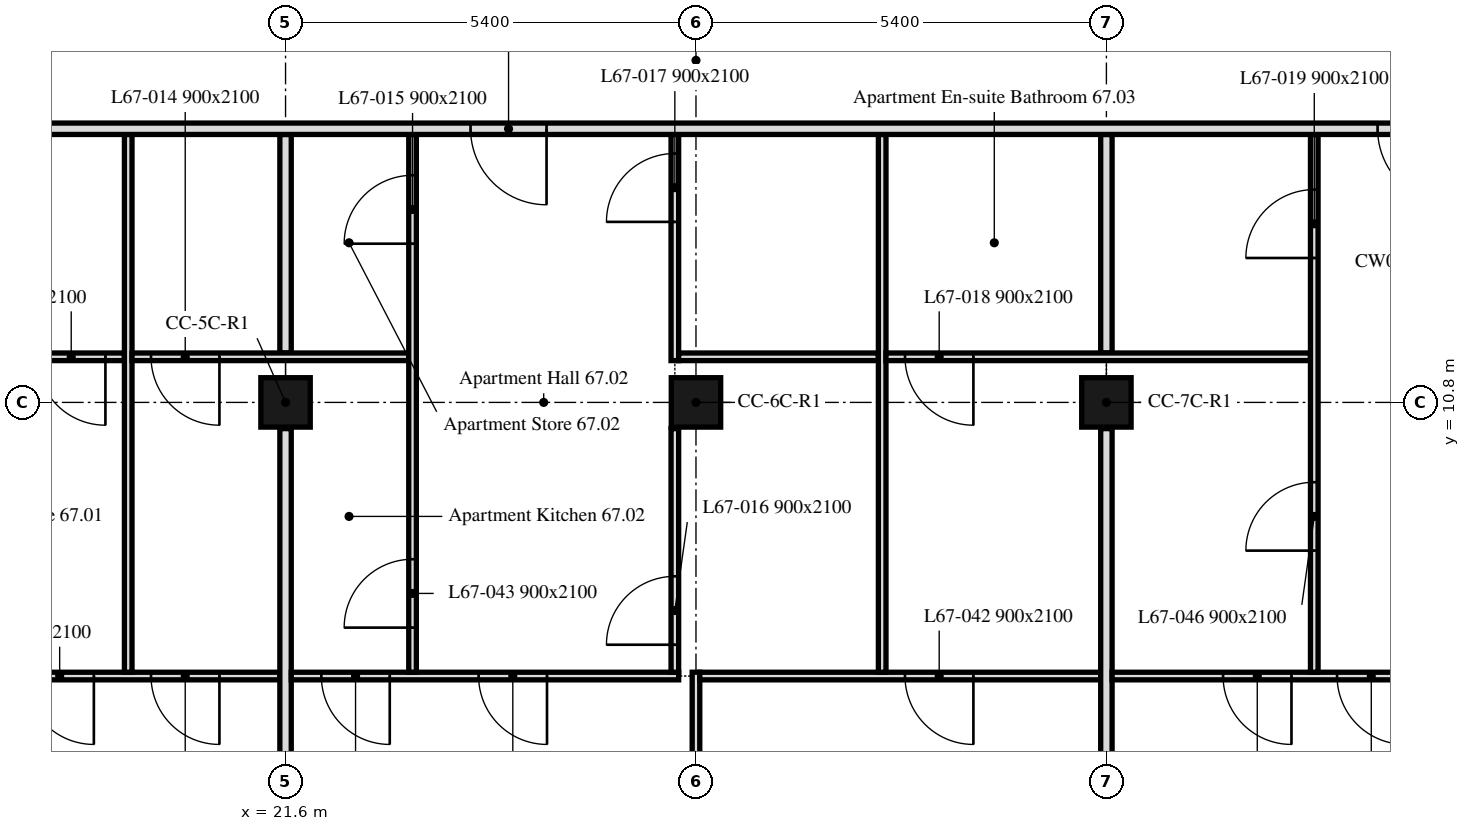
"""IFC4 building model, lengths in metres.
Left out: names, types, materials, properties, quantities, classifications, styles, units other than length and angle.
Written with IfcOpenShell. Run it as: python <this file> out.ifc"""

import sys

from ifc_helpers import new_model, si_unit, direction, frame, frame_2d, origin, origin_2d, place, context, subcontext, project, spatial, rectangle, extrude, element, fill, save


model = new_model("IFC4")
c1 = context("Model", 3, precision=1e-05, world=origin(), true_north=direction((0.0, 1.0)))
c2 = subcontext(c1, "Body", "Model", "MODEL_VIEW")
j1 = project(units=[si_unit("LENGTHUNIT", "METRE"), si_unit("PLANEANGLEUNIT", "RADIAN")], contexts=[c1])
p1 = place(None, origin())
s1 = spatial("IfcSite", under=j1, at=p1, CompositionType="ELEMENT")
p2 = place(p1, origin())
s2 = spatial("IfcBuilding", under=s1, at=p2, CompositionType="ELEMENT")
p3 = place(p2, frame((0.0, 0.0, 275.2)))
s3 = spatial("IfcBuildingStorey", under=s2, at=p3, CompositionType="ELEMENT", Elevation=275.2)
for number, where, z_axis, x_axis in (
    (1, (21.6, 10.8, 0.0), (0.0, 0.0, 1.0), (1.0, 0.0, 0.0)),
    (2, (27.0, 10.8, 0.0), (0.0, 0.0, 1.0), (1.0, 0.0, 0.0)),
    (3, (32.4, 10.8, 0.0), (0.0, 0.0, 1.0), (1.0, 0.0, 0.0)),
):
    element("IfcColumn", number, at=place(p3, frame(where, z_axis=z_axis, x_axis=x_axis)), inside=s3, PredefinedType="COLUMN", context=c2, shape_type="SweptSolid", body=[
        extrude(rectangle(XDim=0.65, YDim=0.65, at=origin_2d()), origin(), (0.0, 0.0, 1.0), 3.0),
    ])
p4 = place(p3, frame((21.525, 7.2, 0.0), z_axis=(0.0, 0.0, 1.0), x_axis=(-1.0, 0.0, 0.0)))
e4 = element("IfcWall", 4, at=p4, inside=s3, PredefinedType="PARTITIONING", context=c2, shape_type="SweptSolid", body=[
    extrude(rectangle(XDim=5.275, YDim=0.1, at=frame_2d((2.637, 0.0))), origin(), (0.0, 0.0, 1.0), 3.0),
])
p5 = place(p4, frame((2.447, 0.0, 0.0)))
e5 = element("IfcOpeningElement", 5, at=p5, cuts=e4, PredefinedType="OPENING", context=c2, shape_type="SweptSolid", body=[
    extrude(rectangle(XDim=0.9, YDim=2.1, at=frame_2d((0.45, 1.05))), frame((0.0, 0.05, 0.0), z_axis=(0.0, -1.0, 0.0), x_axis=(1.0, 0.0, 0.0)), (0.0, 0.0, 1.0), 0.1),
])
p6 = place(p4, frame((0.795, 0.0, 0.0)))
e6 = element("IfcOpeningElement", 6, at=p6, cuts=e4, PredefinedType="OPENING", context=c2, shape_type="SweptSolid", body=[
    extrude(rectangle(XDim=0.9, YDim=2.1, at=frame_2d((0.45, 1.05))), frame((0.0, 0.05, 0.0), z_axis=(0.0, -1.0, 0.0), x_axis=(1.0, 0.0, 0.0)), (0.0, 0.0, 1.0), 0.1),
])
p7 = place(p3, frame((19.48, 11.4, 0.0), z_axis=(0.0, 0.0, 1.0), x_axis=(-1.0, 0.0, 0.0)))
e7 = element("IfcWall", 7, at=p7, inside=s3, PredefinedType="PARTITIONING", context=c2, shape_type="SweptSolid", body=[
    extrude(rectangle(XDim=3.35, YDim=0.1, at=frame_2d((1.675, 0.0))), origin(), (0.0, 0.0, 1.0), 3.0),
])
p8 = place(p7, frame((0.25, 0.0, 0.0)))
e8 = element("IfcOpeningElement", 8, at=p8, cuts=e7, PredefinedType="OPENING", context=c2, shape_type="SweptSolid", body=[
    extrude(rectangle(XDim=0.9, YDim=2.1, at=frame_2d((0.45, 1.05))), frame((0.0, 0.05, 0.0), z_axis=(0.0, -1.0, 0.0), x_axis=(1.0, 0.0, 0.0)), (0.0, 0.0, 1.0), 0.1),
])
p9 = place(p3, frame((19.53, 7.25, 0.0), z_axis=(0.0, 0.0, 1.0), x_axis=(0.0, 1.0, 0.0)))
e9 = element("IfcWall", 9, at=p9, inside=s3, PredefinedType="PARTITIONING", context=c2, shape_type="SweptSolid", body=[
    extrude(rectangle(XDim=7.075, YDim=0.1, at=frame_2d((3.538, 0.0))), origin(), (0.0, 0.0, 1.0), 3.0),
])
p10 = place(p3, frame((21.6, 5.745, 0.0), z_axis=(0.0, 0.0, 1.0), x_axis=(0.0, 1.0, 0.0)))
e10 = element("IfcWall", 10, at=p10, inside=s3, PredefinedType="PARTITIONING", context=c2, shape_type="SweptSolid", body=[
    extrude(rectangle(XDim=4.71, YDim=0.15, at=frame_2d((2.355, 0.0))), origin(), (0.0, 0.0, 1.0), 2.4),
])
p11 = place(p3, frame((21.6, 11.45, 0.0), z_axis=(0.0, 0.0, 1.0), x_axis=(0.0, 1.0, 0.0)))
e11 = element("IfcWall", 11, at=p11, inside=s3, PredefinedType="PARTITIONING", context=c2, shape_type="SweptSolid", body=[
    extrude(rectangle(XDim=2.875, YDim=0.15, at=frame_2d((1.438, 0.0))), origin(), (0.0, 0.0, 1.0), 2.4),
])
p12 = place(p3, frame((27.0, 5.745, 0.0), z_axis=(0.0, 0.0, 1.0), x_axis=(0.0, 1.0, 0.0)))
e12 = element("IfcWall", 12, at=p12, inside=s3, PredefinedType="PARTITIONING", context=c2, shape_type="SweptSolid", body=[
    extrude(rectangle(XDim=1.505, YDim=0.1, at=frame_2d((0.752, 0.0))), origin(), (0.0, 0.0, 1.0), 2.4),
])
p13 = place(p3, frame((26.772, 7.2, 0.0), z_axis=(0.0, 0.0, 1.0), x_axis=(-1.0, 0.0, 0.0)))
e13 = element("IfcWall", 13, at=p13, inside=s3, PredefinedType="PARTITIONING", context=c2, shape_type="SweptSolid", body=[
    extrude(rectangle(XDim=5.097, YDim=0.1, at=frame_2d((2.548, 0.0))), origin(), (0.0, 0.0, 1.0), 3.0),
])
p14 = place(p13, frame((3.801, 0.0, 0.0)))
e14 = element("IfcOpeningElement", 14, at=p14, cuts=e13, PredefinedType="OPENING", context=c2, shape_type="SweptSolid", body=[
    extrude(rectangle(XDim=0.9, YDim=2.1, at=frame_2d((0.45, 1.05))), frame((0.0, 0.05, 0.0), z_axis=(0.0, -1.0, 0.0), x_axis=(1.0, 0.0, 0.0)), (0.0, 0.0, 1.0), 0.1),
])
p15 = place(p13, frame((1.732, 0.0, 0.0)))
e15 = element("IfcOpeningElement", 15, at=p15, cuts=e13, PredefinedType="OPENING", context=c2, shape_type="SweptSolid", body=[
    extrude(rectangle(XDim=0.9, YDim=2.1, at=frame_2d((0.45, 1.05))), frame((0.0, 0.05, 0.0), z_axis=(0.0, -1.0, 0.0), x_axis=(1.0, 0.0, 0.0)), (0.0, 0.0, 1.0), 0.1),
])
p16 = place(p3, frame((32.325, 7.2, 0.0), z_axis=(0.0, 0.0, 1.0), x_axis=(-1.0, 0.0, 0.0)))
e16 = element("IfcWall", 16, at=p16, inside=s3, PredefinedType="PARTITIONING", context=c2, shape_type="SweptSolid", body=[
    extrude(rectangle(XDim=5.275, YDim=0.1, at=frame_2d((2.637, 0.0))), origin(), (0.0, 0.0, 1.0), 3.0),
])
p17 = place(p16, frame((1.675, 0.0, 0.0)))
e17 = element("IfcOpeningElement", 17, at=p17, cuts=e16, PredefinedType="OPENING", context=c2, shape_type="SweptSolid", body=[
    extrude(rectangle(XDim=0.9, YDim=2.1, at=frame_2d((0.45, 1.05))), frame((0.0, 0.05, 0.0), z_axis=(0.0, -1.0, 0.0), x_axis=(1.0, 0.0, 0.0)), (0.0, 0.0, 1.0), 0.1),
])
p18 = place(p3, frame((23.221, 11.4, 0.0), z_axis=(0.0, 0.0, 1.0), x_axis=(-1.0, 0.0, 0.0)))
e18 = element("IfcWall", 18, at=p18, inside=s3, PredefinedType="PARTITIONING", context=c2, shape_type="SweptSolid", body=[
    extrude(rectangle(XDim=3.641, YDim=0.1, at=frame_2d((1.82, 0.0))), origin(), (0.0, 0.0, 1.0), 2.4),
])
p19 = place(p18, frame((2.491, 0.0, 0.0)))
e19 = element("IfcOpeningElement", 19, at=p19, cuts=e18, PredefinedType="OPENING", context=c2, shape_type="SweptSolid", body=[
    extrude(rectangle(XDim=0.9, YDim=2.1, at=frame_2d((0.45, 1.05))), frame((0.0, 0.05, 0.0), z_axis=(0.0, -1.0, 0.0), x_axis=(1.0, 0.0, 0.0)), (0.0, 0.0, 1.0), 0.1),
])
p20 = place(p3, frame((23.271, 7.25, 0.0), z_axis=(0.0, 0.0, 1.0), x_axis=(0.0, 1.0, 0.0)))
e20 = element("IfcWall", 20, at=p20, inside=s3, PredefinedType="PARTITIONING", context=c2, shape_type="SweptSolid", body=[
    extrude(rectangle(XDim=7.075, YDim=0.1, at=frame_2d((3.538, 0.0))), origin(), (0.0, 0.0, 1.0), 3.0),
])
p21 = place(p20, frame((5.638, 0.0, 0.0)))
e21 = element("IfcOpeningElement", 21, at=p21, cuts=e20, PredefinedType="OPENING", context=c2, shape_type="SweptSolid", body=[
    extrude(rectangle(XDim=0.9, YDim=2.1, at=frame_2d((0.45, 1.05))), frame((0.0, 0.05, 0.0), z_axis=(0.0, -1.0, 0.0), x_axis=(1.0, 0.0, 0.0)), (0.0, 0.0, 1.0), 0.1),
])
p22 = place(p20, frame((0.587, 0.0, 0.0)))
e22 = element("IfcOpeningElement", 22, at=p22, cuts=e20, PredefinedType="OPENING", context=c2, shape_type="SweptSolid", body=[
    extrude(rectangle(XDim=0.9, YDim=2.1, at=frame_2d((0.45, 1.05))), frame((0.0, 0.05, 0.0), z_axis=(0.0, -1.0, 0.0), x_axis=(1.0, 0.0, 0.0)), (0.0, 0.0, 1.0), 0.1),
])
p23 = place(p3, frame((26.722, 7.25, 0.0), z_axis=(0.0, 0.0, 1.0), x_axis=(0.0, 1.0, 0.0)))
e23 = element("IfcWall", 23, at=p23, inside=s3, PredefinedType="PARTITIONING", context=c2, shape_type="SweptSolid", body=[
    extrude(rectangle(XDim=3.205, YDim=0.1, at=frame_2d((1.603, 0.0))), origin(), (0.0, 0.0, 1.0), 3.0),
])
p24 = place(p23, frame((0.362, 0.0, 0.0)))
e24 = element("IfcOpeningElement", 24, at=p24, cuts=e23, PredefinedType="OPENING", context=c2, shape_type="SweptSolid", body=[
    extrude(rectangle(XDim=0.9, YDim=2.1, at=frame_2d((0.45, 1.05))), frame((0.0, 0.05, 0.0), z_axis=(0.0, -1.0, 0.0), x_axis=(1.0, 0.0, 0.0)), (0.0, 0.0, 1.0), 0.1),
])
p25 = place(p3, frame((26.722, 11.35, 0.0), z_axis=(0.0, 0.0, 1.0), x_axis=(0.0, 1.0, 0.0)))
e25 = element("IfcWall", 25, at=p25, inside=s3, PredefinedType="PARTITIONING", context=c2, shape_type="SweptSolid", body=[
    extrude(rectangle(XDim=2.975, YDim=0.1, at=frame_2d((1.487, 0.0))), origin(), (0.0, 0.0, 1.0), 3.0),
])
p26 = place(p25, frame((1.825, 0.0, 0.0)))
e26 = element("IfcOpeningElement", 26, at=p26, cuts=e25, PredefinedType="OPENING", context=c2, shape_type="SweptSolid", body=[
    extrude(rectangle(XDim=0.9, YDim=2.1, at=frame_2d((0.45, 1.05))), frame((0.0, 0.05, 0.0), z_axis=(0.0, -1.0, 0.0), x_axis=(1.0, 0.0, 0.0)), (0.0, 0.0, 1.0), 0.1),
])
p27 = place(p3, frame((29.4, 11.4, 0.0), z_axis=(0.0, 0.0, 1.0), x_axis=(-1.0, 0.0, 0.0)))
e27 = element("IfcWall", 27, at=p27, inside=s3, PredefinedType="PARTITIONING", context=c2, shape_type="SweptSolid", body=[
    extrude(rectangle(XDim=2.628, YDim=0.1, at=frame_2d((1.314, 0.0))), origin(), (0.0, 0.0, 1.0), 2.4),
])
p28 = place(p3, frame((29.45, 7.25, 0.0), z_axis=(0.0, 0.0, 1.0), x_axis=(0.0, 1.0, 0.0)))
e28 = element("IfcWall", 28, at=p28, inside=s3, PredefinedType="PARTITIONING", context=c2, shape_type="SweptSolid", body=[
    extrude(rectangle(XDim=7.075, YDim=0.1, at=frame_2d((3.538, 0.0))), origin(), (0.0, 0.0, 1.0), 3.0),
])
p29 = place(p3, frame((32.4, 5.745, 0.0), z_axis=(0.0, 0.0, 1.0), x_axis=(0.0, 1.0, 0.0)))
e29 = element("IfcWall", 29, at=p29, inside=s3, PredefinedType="PARTITIONING", context=c2, shape_type="SweptSolid", body=[
    extrude(rectangle(XDim=4.71, YDim=0.15, at=frame_2d((2.355, 0.0))), origin(), (0.0, 0.0, 1.0), 2.4),
])
p30 = place(p3, frame((32.4, 11.45, 0.0), z_axis=(0.0, 0.0, 1.0), x_axis=(0.0, 1.0, 0.0)))
e30 = element("IfcWall", 30, at=p30, inside=s3, PredefinedType="PARTITIONING", context=c2, shape_type="SweptSolid", body=[
    extrude(rectangle(XDim=2.875, YDim=0.15, at=frame_2d((1.438, 0.0))), origin(), (0.0, 0.0, 1.0), 2.4),
])
p31 = place(p3, frame((37.725, 7.2, 0.0), z_axis=(0.0, 0.0, 1.0), x_axis=(-1.0, 0.0, 0.0)))
e31 = element("IfcWall", 31, at=p31, inside=s3, PredefinedType="PARTITIONING", context=c2, shape_type="SweptSolid", body=[
    extrude(rectangle(XDim=5.25, YDim=0.1, at=frame_2d((2.625, 0.0))), origin(), (0.0, 0.0, 1.0), 3.0),
])
p32 = place(p31, frame((2.89, 0.0, 0.0)))
e32 = element("IfcOpeningElement", 32, at=p32, cuts=e31, PredefinedType="OPENING", context=c2, shape_type="SweptSolid", body=[
    extrude(rectangle(XDim=0.9, YDim=2.1, at=frame_2d((0.45, 1.05))), frame((0.0, 0.05, 0.0), z_axis=(0.0, -1.0, 0.0), x_axis=(1.0, 0.0, 0.0)), (0.0, 0.0, 1.0), 0.1),
])
p33 = place(p31, frame((1.39, 0.0, 0.0)))
e33 = element("IfcOpeningElement", 33, at=p33, cuts=e31, PredefinedType="OPENING", context=c2, shape_type="SweptSolid", body=[
    extrude(rectangle(XDim=0.9, YDim=2.1, at=frame_2d((0.45, 1.05))), frame((0.0, 0.05, 0.0), z_axis=(0.0, -1.0, 0.0), x_axis=(1.0, 0.0, 0.0)), (0.0, 0.0, 1.0), 0.1),
])
p34 = place(p3, frame((35.085, 11.4, 0.0), z_axis=(0.0, 0.0, 1.0), x_axis=(-1.0, 0.0, 0.0)))
e34 = element("IfcWall", 34, at=p34, inside=s3, PredefinedType="PARTITIONING", context=c2, shape_type="SweptSolid", body=[
    extrude(rectangle(XDim=5.585, YDim=0.1, at=frame_2d((2.792, 0.0))), origin(), (0.0, 0.0, 1.0), 2.4),
])
p35 = place(p34, frame((4.435, 0.0, 0.0)))
e35 = element("IfcOpeningElement", 35, at=p35, cuts=e34, PredefinedType="OPENING", context=c2, shape_type="SweptSolid", body=[
    extrude(rectangle(XDim=0.9, YDim=2.1, at=frame_2d((0.45, 1.05))), frame((0.0, 0.05, 0.0), z_axis=(0.0, -1.0, 0.0), x_axis=(1.0, 0.0, 0.0)), (0.0, 0.0, 1.0), 0.1),
])
p36 = place(p3, frame((35.135, 7.25, 0.0), z_axis=(0.0, 0.0, 1.0), x_axis=(0.0, 1.0, 0.0)))
e36 = element("IfcWall", 36, at=p36, inside=s3, PredefinedType="PARTITIONING", context=c2, shape_type="SweptSolid", body=[
    extrude(rectangle(XDim=7.075, YDim=0.1, at=frame_2d((3.538, 0.0))), origin(), (0.0, 0.0, 1.0), 2.4),
])
p37 = place(p36, frame((5.45, 0.0, 0.0)))
e37 = element("IfcOpeningElement", 37, at=p37, cuts=e36, PredefinedType="OPENING", context=c2, shape_type="SweptSolid", body=[
    extrude(rectangle(XDim=0.9, YDim=2.1, at=frame_2d((0.45, 1.05))), frame((0.0, 0.05, 0.0), z_axis=(0.0, -1.0, 0.0), x_axis=(1.0, 0.0, 0.0)), (0.0, 0.0, 1.0), 0.1),
])
p38 = place(p36, frame((1.6, 0.0, 0.0)))
e38 = element("IfcOpeningElement", 38, at=p38, cuts=e36, PredefinedType="OPENING", context=c2, shape_type="SweptSolid", body=[
    extrude(rectangle(XDim=0.9, YDim=2.1, at=frame_2d((0.45, 1.05))), frame((0.0, 0.05, 0.0), z_axis=(0.0, -1.0, 0.0), x_axis=(1.0, 0.0, 0.0)), (0.0, 0.0, 1.0), 0.1),
])
p39 = place(p3, frame((47.849, 14.4, 0.0), z_axis=(0.0, 0.0, 1.0), x_axis=(-1.0, 0.0, 0.0)))
e39 = element("IfcWall", 39, at=p39, inside=s3, PredefinedType="PARTITIONING", context=c2, shape_type="SweptSolid", body=[
    extrude(rectangle(XDim=41.698, YDim=0.15, at=frame_2d((20.849, 0.0))), origin(), (0.0, 0.0, 1.0), 2.4),
])
p40 = place(p39, frame((10.881, 0.0, 0.0)))
e40 = element("IfcOpeningElement", 40, at=p40, cuts=e39, PredefinedType="OPENING", context=c2, shape_type="SweptSolid", body=[
    extrude(rectangle(XDim=1.0, YDim=2.1, at=frame_2d((0.5, 1.05))), frame((0.0, 0.075, 0.0), z_axis=(0.0, -1.0, 0.0), x_axis=(1.0, 0.0, 0.0)), (0.0, 0.0, 1.0), 0.15),
])
p41 = place(p39, frame((37.759, 0.0, 0.0)))
e41 = element("IfcOpeningElement", 41, at=p41, cuts=e39, PredefinedType="OPENING", context=c2, shape_type="SweptSolid", body=[
    extrude(rectangle(XDim=1.0, YDim=2.1, at=frame_2d((0.5, 1.05))), frame((0.0, 0.075, 0.0), z_axis=(0.0, -1.0, 0.0), x_axis=(1.0, 0.0, 0.0)), (0.0, 0.0, 1.0), 0.15),
])
p42 = place(p39, frame((22.815, 0.0, 0.0)))
e42 = element("IfcOpeningElement", 42, at=p42, cuts=e39, PredefinedType="OPENING", context=c2, shape_type="SweptSolid", body=[
    extrude(rectangle(XDim=1.0, YDim=2.1, at=frame_2d((0.5, 1.05))), frame((0.0, 0.075, 0.0), z_axis=(0.0, -1.0, 0.0), x_axis=(1.0, 0.0, 0.0)), (0.0, 0.0, 1.0), 0.15),
])
p43 = place(p39, frame((4.85, 0.0, 0.0)))
e43 = element("IfcOpeningElement", 43, at=p43, cuts=e39, PredefinedType="OPENING", context=c2, shape_type="SweptSolid", body=[
    extrude(rectangle(XDim=1.0, YDim=2.1, at=frame_2d((0.5, 1.05))), frame((0.0, 0.075, 0.0), z_axis=(0.0, -1.0, 0.0), x_axis=(1.0, 0.0, 0.0)), (0.0, 0.0, 1.0), 0.15),
])
p44 = place(p8, origin())
e44 = element("IfcDoor", 44, at=p44, inside=s3, OperationType="SINGLE_SWING_RIGHT", PredefinedType="DOOR", context=c2, shape_type="SweptSolid", body=[
    extrude(rectangle(XDim=0.9, YDim=2.1, at=frame_2d((0.45, 1.05))), frame((0.0, 0.025, 0.0), z_axis=(0.0, -1.0, 0.0), x_axis=(1.0, 0.0, 0.0)), (0.0, 0.0, 1.0), 0.05),
])
fill(e8, e44)
p45 = place(p19, origin())
e45 = element("IfcDoor", 45, at=p45, inside=s3, OperationType="SINGLE_SWING_RIGHT", PredefinedType="DOOR", context=c2, shape_type="SweptSolid", body=[
    extrude(rectangle(XDim=0.9, YDim=2.1, at=frame_2d((0.45, 1.05))), frame((0.0, 0.025, 0.0), z_axis=(0.0, -1.0, 0.0), x_axis=(1.0, 0.0, 0.0)), (0.0, 0.0, 1.0), 0.05),
])
fill(e19, e45)
p46 = place(p21, origin())
e46 = element("IfcDoor", 46, at=p46, inside=s3, OperationType="SINGLE_SWING_LEFT", PredefinedType="DOOR", context=c2, shape_type="SweptSolid", body=[
    extrude(rectangle(XDim=0.9, YDim=2.1, at=frame_2d((0.45, 1.05))), frame((0.0, 0.025, 0.0), z_axis=(0.0, -1.0, 0.0), x_axis=(1.0, 0.0, 0.0)), (0.0, 0.0, 1.0), 0.05),
])
fill(e21, e46)
p47 = place(p24, origin())
e47 = element("IfcDoor", 47, at=p47, inside=s3, OperationType="SINGLE_SWING_RIGHT", PredefinedType="DOOR", context=c2, shape_type="SweptSolid", body=[
    extrude(rectangle(XDim=0.9, YDim=2.1, at=frame_2d((0.45, 1.05))), frame((0.0, 0.025, 0.0), z_axis=(0.0, -1.0, 0.0), x_axis=(1.0, 0.0, 0.0)), (0.0, 0.0, 1.0), 0.05),
])
fill(e24, e47)
p48 = place(p26, origin())
e48 = element("IfcDoor", 48, at=p48, inside=s3, OperationType="SINGLE_SWING_RIGHT", PredefinedType="DOOR", context=c2, shape_type="SweptSolid", body=[
    extrude(rectangle(XDim=0.9, YDim=2.1, at=frame_2d((0.45, 1.05))), frame((0.0, 0.025, 0.0), z_axis=(0.0, -1.0, 0.0), x_axis=(1.0, 0.0, 0.0)), (0.0, 0.0, 1.0), 0.05),
])
fill(e26, e48)
p49 = place(p35, origin())
e49 = element("IfcDoor", 49, at=p49, inside=s3, OperationType="SINGLE_SWING_RIGHT", PredefinedType="DOOR", context=c2, shape_type="SweptSolid", body=[
    extrude(rectangle(XDim=0.9, YDim=2.1, at=frame_2d((0.45, 1.05))), frame((0.0, 0.025, 0.0), z_axis=(0.0, -1.0, 0.0), x_axis=(1.0, 0.0, 0.0)), (0.0, 0.0, 1.0), 0.05),
])
fill(e35, e49)
p50 = place(p37, origin())
e50 = element("IfcDoor", 50, at=p50, inside=s3, OperationType="SINGLE_SWING_RIGHT", PredefinedType="DOOR", context=c2, shape_type="SweptSolid", body=[
    extrude(rectangle(XDim=0.9, YDim=2.1, at=frame_2d((0.45, 1.05))), frame((0.0, 0.025, 0.0), z_axis=(0.0, -1.0, 0.0), x_axis=(1.0, 0.0, 0.0)), (0.0, 0.0, 1.0), 0.05),
])
fill(e37, e50)
p51 = place(p5, origin())
e51 = element("IfcDoor", 51, at=p51, inside=s3, OperationType="SINGLE_SWING_LEFT", PredefinedType="DOOR", context=c2, shape_type="SweptSolid", body=[
    extrude(rectangle(XDim=0.9, YDim=2.1, at=frame_2d((0.45, 1.05))), frame((0.0, 0.025, 0.0), z_axis=(0.0, -1.0, 0.0), x_axis=(1.0, 0.0, 0.0)), (0.0, 0.0, 1.0), 0.05),
])
fill(e5, e51)
p52 = place(p6, origin())
e52 = element("IfcDoor", 52, at=p52, inside=s3, OperationType="SINGLE_SWING_RIGHT", PredefinedType="DOOR", context=c2, shape_type="SweptSolid", body=[
    extrude(rectangle(XDim=0.9, YDim=2.1, at=frame_2d((0.45, 1.05))), frame((0.0, 0.025, 0.0), z_axis=(0.0, -1.0, 0.0), x_axis=(1.0, 0.0, 0.0)), (0.0, 0.0, 1.0), 0.05),
])
fill(e6, e52)
p53 = place(p14, origin())
e53 = element("IfcDoor", 53, at=p53, inside=s3, OperationType="SINGLE_SWING_LEFT", PredefinedType="DOOR", context=c2, shape_type="SweptSolid", body=[
    extrude(rectangle(XDim=0.9, YDim=2.1, at=frame_2d((0.45, 1.05))), frame((0.0, 0.025, 0.0), z_axis=(0.0, -1.0, 0.0), x_axis=(1.0, 0.0, 0.0)), (0.0, 0.0, 1.0), 0.05),
])
fill(e14, e53)
p54 = place(p17, origin())
e54 = element("IfcDoor", 54, at=p54, inside=s3, OperationType="SINGLE_SWING_RIGHT", PredefinedType="DOOR", context=c2, shape_type="SweptSolid", body=[
    extrude(rectangle(XDim=0.9, YDim=2.1, at=frame_2d((0.45, 1.05))), frame((0.0, 0.025, 0.0), z_axis=(0.0, -1.0, 0.0), x_axis=(1.0, 0.0, 0.0)), (0.0, 0.0, 1.0), 0.05),
])
fill(e17, e54)
p55 = place(p22, origin())
e55 = element("IfcDoor", 55, at=p55, inside=s3, OperationType="SINGLE_SWING_RIGHT", PredefinedType="DOOR", context=c2, shape_type="SweptSolid", body=[
    extrude(rectangle(XDim=0.9, YDim=2.1, at=frame_2d((0.45, 1.05))), frame((0.0, 0.025, 0.0), z_axis=(0.0, -1.0, 0.0), x_axis=(1.0, 0.0, 0.0)), (0.0, 0.0, 1.0), 0.05),
])
fill(e22, e55)
p56 = place(p32, origin())
e56 = element("IfcDoor", 56, at=p56, inside=s3, OperationType="SINGLE_SWING_LEFT", PredefinedType="DOOR", context=c2, shape_type="SweptSolid", body=[
    extrude(rectangle(XDim=0.9, YDim=2.1, at=frame_2d((0.45, 1.05))), frame((0.0, 0.025, 0.0), z_axis=(0.0, -1.0, 0.0), x_axis=(1.0, 0.0, 0.0)), (0.0, 0.0, 1.0), 0.05),
])
fill(e32, e56)
p57 = place(p33, origin())
e57 = element("IfcDoor", 57, at=p57, inside=s3, OperationType="SINGLE_SWING_RIGHT", PredefinedType="DOOR", context=c2, shape_type="SweptSolid", body=[
    extrude(rectangle(XDim=0.9, YDim=2.1, at=frame_2d((0.45, 1.05))), frame((0.0, 0.025, 0.0), z_axis=(0.0, -1.0, 0.0), x_axis=(1.0, 0.0, 0.0)), (0.0, 0.0, 1.0), 0.05),
])
fill(e33, e57)
p58 = place(p38, origin())
e58 = element("IfcDoor", 58, at=p58, inside=s3, OperationType="SINGLE_SWING_LEFT", PredefinedType="DOOR", context=c2, shape_type="SweptSolid", body=[
    extrude(rectangle(XDim=0.9, YDim=2.1, at=frame_2d((0.45, 1.05))), frame((0.0, 0.025, 0.0), z_axis=(0.0, -1.0, 0.0), x_axis=(1.0, 0.0, 0.0)), (0.0, 0.0, 1.0), 0.05),
])
fill(e38, e58)
p59 = place(p15, origin())
e59 = element("IfcDoor", 59, at=p59, inside=s3, OperationType="SINGLE_SWING_RIGHT", PredefinedType="DOOR", context=c2, shape_type="SweptSolid", body=[
    extrude(rectangle(XDim=0.9, YDim=2.1, at=frame_2d((0.45, 1.05))), frame((0.0, 0.025, 0.0), z_axis=(0.0, -1.0, 0.0), x_axis=(1.0, 0.0, 0.0)), (0.0, 0.0, 1.0), 0.05),
])
fill(e15, e59)
p60 = place(p40, origin())
e60 = element("IfcDoor", 60, at=p60, inside=s3, OperationType="SINGLE_SWING_RIGHT", PredefinedType="DOOR", context=c2, shape_type="SweptSolid", body=[
    extrude(rectangle(XDim=1.0, YDim=2.1, at=frame_2d((0.5, 1.05))), frame((0.0, 0.025, 0.0), z_axis=(0.0, -1.0, 0.0), x_axis=(1.0, 0.0, 0.0)), (0.0, 0.0, 1.0), 0.05),
])
fill(e40, e60)
p61 = place(p42, origin())
e61 = element("IfcDoor", 61, at=p61, inside=s3, OperationType="SINGLE_SWING_LEFT", PredefinedType="DOOR", context=c2, shape_type="SweptSolid", body=[
    extrude(rectangle(XDim=1.0, YDim=2.1, at=frame_2d((0.5, 1.05))), frame((0.0, 0.025, 0.0), z_axis=(0.0, -1.0, 0.0), x_axis=(1.0, 0.0, 0.0)), (0.0, 0.0, 1.0), 0.05),
])
fill(e42, e61)
save(model, sys.argv[1])
